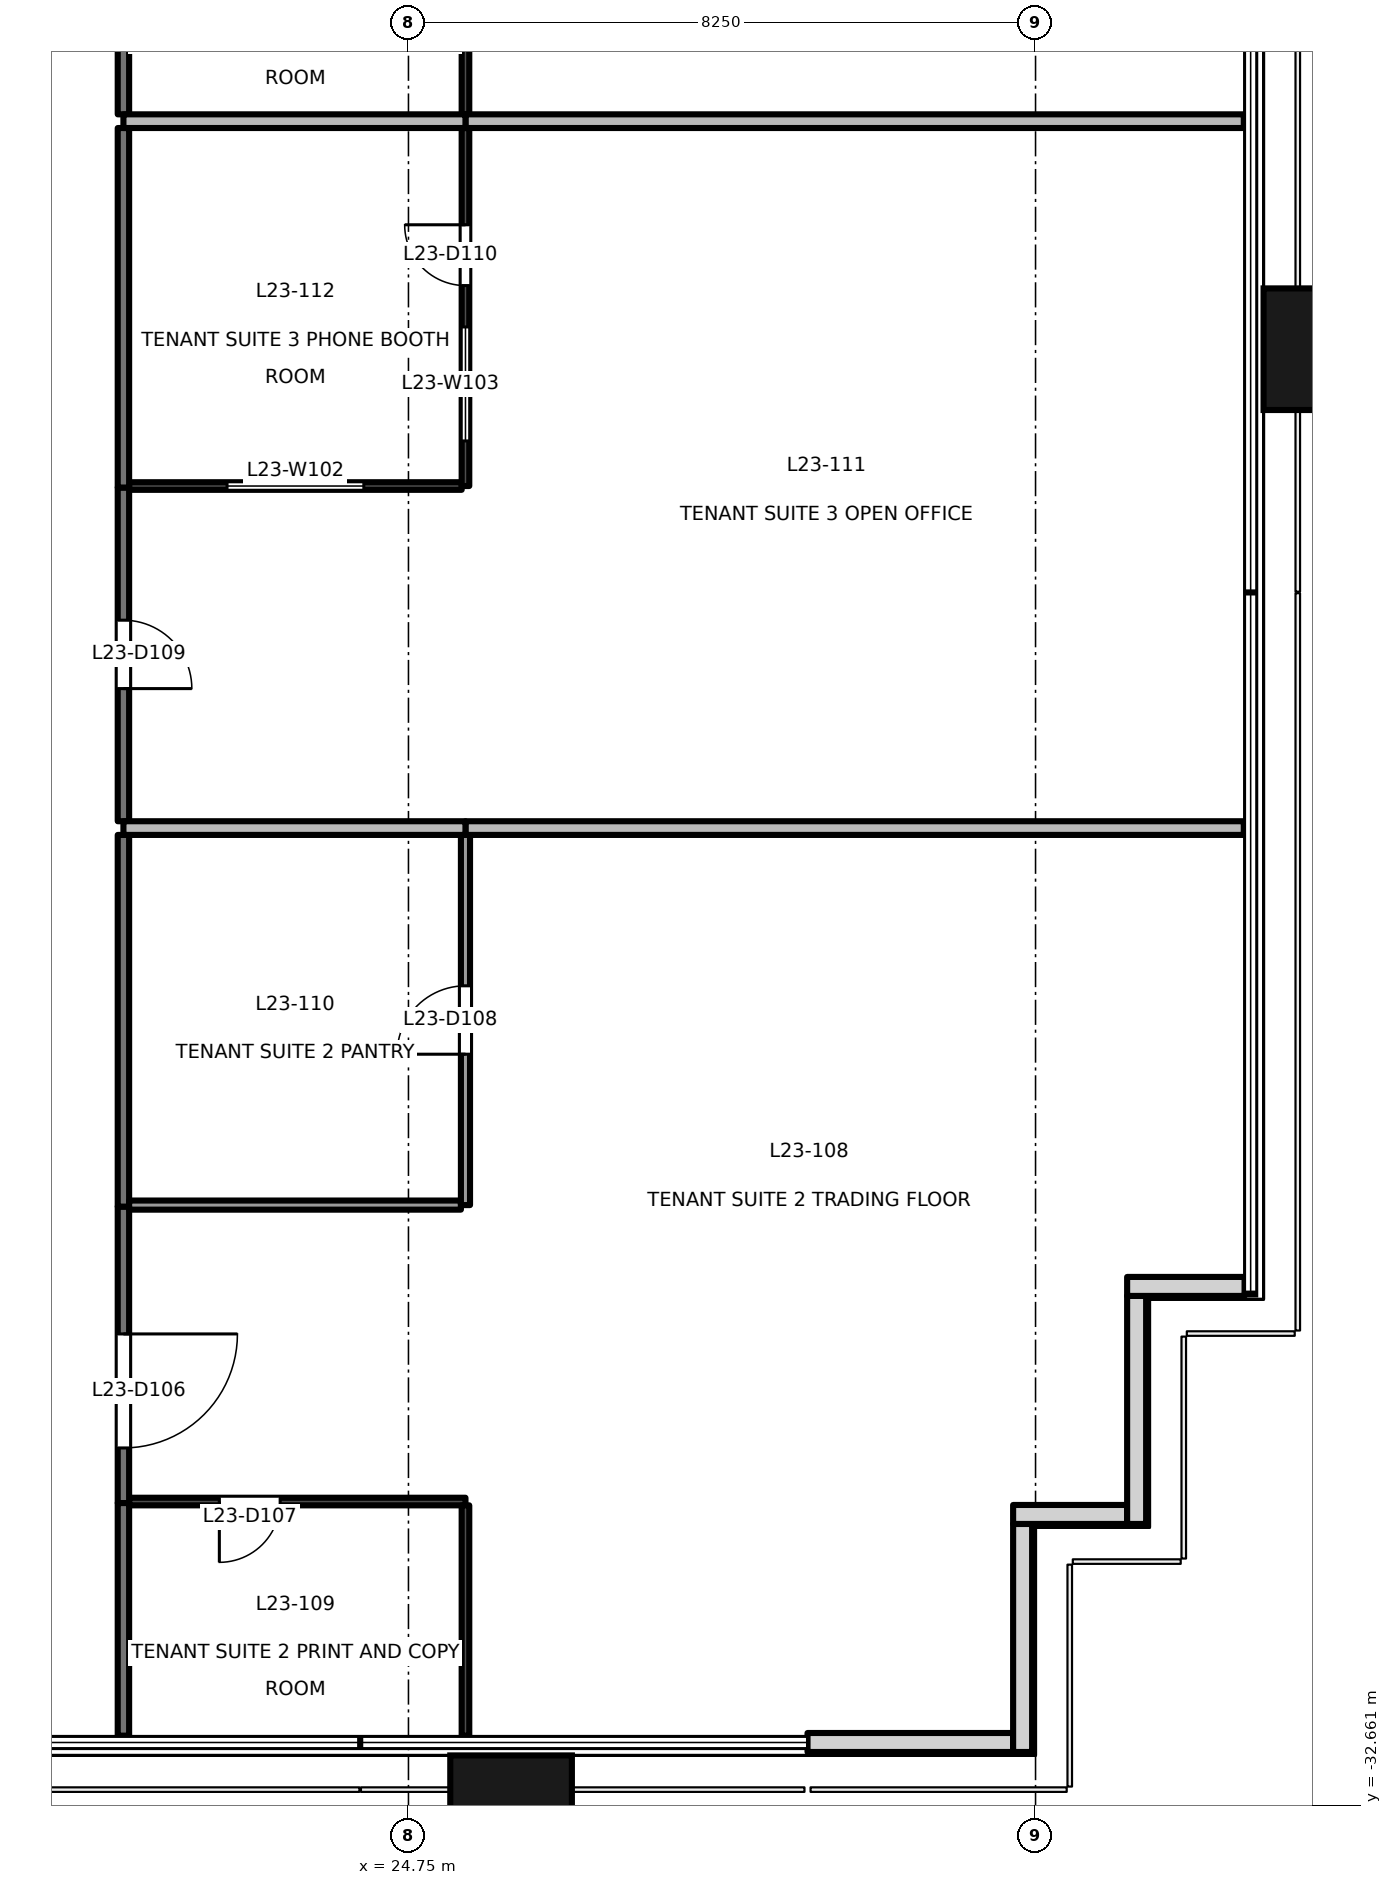
"""IFC4 building model, lengths in metres.
Left out: names, types, materials, properties, quantities, classifications, styles, units other than length and angle.
Written with IfcOpenShell. Run it as: python <this file> out.ifc"""

import sys

from ifc_helpers import new_model, si_unit, direction, frame, frame_2d, origin, origin_2d, place, context, subcontext, project, spatial, rectangle, extrude, element, fill, save


model = new_model("IFC4")
c1 = context("Model", 3, precision=1e-05, world=origin(), true_north=direction((0.0, 1.0)))
c2 = subcontext(c1, "Body", "Model", "MODEL_VIEW")
j1 = project(units=[si_unit("LENGTHUNIT", "METRE"), si_unit("PLANEANGLEUNIT", "RADIAN")], contexts=[c1])
p1 = place(None, origin())
s1 = spatial("IfcSite", under=j1, at=p1, CompositionType="ELEMENT")
p2 = place(p1, origin())
s2 = spatial("IfcBuilding", under=s1, at=p2, CompositionType="ELEMENT")
p3 = place(p2, frame((0.0, 0.0, 103.7)))
s3 = spatial("IfcBuildingStorey", under=s2, at=p3, CompositionType="ELEMENT", Elevation=103.7)
for number, where, z_axis, x_axis in (
    (1, (26.1, -32.9, -0.2), (0.0, 0.0, 1.0), (1.0, 0.0, 0.0)),
    (2, (36.9, -13.5, -0.2), (0.0, 0.0, 1.0), (0.0, 1.0, 0.0)),
):
    element("IfcColumn", number, at=place(p3, frame(where, z_axis=z_axis, x_axis=x_axis)), inside=s3, PredefinedType="COLUMN", context=c2, shape_type="SweptSolid", body=[
        extrude(rectangle(XDim=1.6, YDim=1.8, at=origin_2d()), origin(), (0.0, 0.0, 1.0), 4.0),
    ])
p4 = place(p3, frame((30.0, -31.83, 0.0), z_axis=(0.0, 0.0, 1.0), x_axis=(1.0, 0.0, 0.0)))
e3 = element("IfcWall", 3, at=p4, inside=s3, PredefinedType="SOLIDWALL", context=c2, shape_type="SweptSolid", body=[
    extrude(rectangle(XDim=2.705, YDim=0.25, at=frame_2d((1.353, 0.0))), origin(), (0.0, 0.0, 1.0), 3.8),
])
p5 = place(p3, frame((32.83, -31.955, 0.0), z_axis=(0.0, 0.0, 1.0), x_axis=(0.0, 1.0, 0.0)))
e4 = element("IfcWall", 4, at=p5, inside=s3, PredefinedType="SOLIDWALL", context=c2, shape_type="SweptSolid", body=[
    extrude(rectangle(XDim=3.0, YDim=0.25, at=frame_2d((1.5, 0.0))), origin(), (0.0, 0.0, 1.0), 3.8),
])
p6 = place(p3, frame((32.705, -28.83, 0.0), z_axis=(0.0, 0.0, 1.0), x_axis=(1.0, 0.0, 0.0)))
e5 = element("IfcWall", 5, at=p6, inside=s3, PredefinedType="SOLIDWALL", context=c2, shape_type="SweptSolid", body=[
    extrude(rectangle(XDim=1.5, YDim=0.25, at=frame_2d((0.75, 0.0))), origin(), (0.0, 0.0, 1.0), 3.8),
])
p7 = place(p3, frame((34.33, -28.955, 0.0), z_axis=(0.0, 0.0, 1.0), x_axis=(0.0, 1.0, 0.0)))
e6 = element("IfcWall", 6, at=p7, inside=s3, PredefinedType="SOLIDWALL", context=c2, shape_type="SweptSolid", body=[
    extrude(rectangle(XDim=3.0, YDim=0.25, at=frame_2d((1.5, 0.0))), origin(), (0.0, 0.0, 1.0), 3.8),
])
p8 = place(p3, frame((34.205, -25.83, 0.0), z_axis=(0.0, 0.0, 1.0), x_axis=(1.0, 0.0, 0.0)))
e7 = element("IfcWall", 7, at=p8, inside=s3, PredefinedType="SOLIDWALL", context=c2, shape_type="SweptSolid", body=[
    extrude(rectangle(XDim=1.545, YDim=0.25, at=frame_2d((0.772, 0.0))), origin(), (0.0, 0.0, 1.0), 3.8),
])
p9 = place(p3, frame((21.0, -24.78, 0.0), z_axis=(0.0, 0.0, 1.0), x_axis=(0.0, -1.0, 0.0)))
e8 = element("IfcWall", 8, at=p9, inside=s3, PredefinedType="PARTITIONING", context=c2, shape_type="SweptSolid", body=[
    extrude(rectangle(XDim=3.9, YDim=0.15, at=frame_2d((1.95, 0.0))), origin(), (0.0, 0.0, 1.0), 3.8),
])
p10 = place(p9, frame((1.675, 0.0, 0.0)))
e9 = element("IfcOpeningElement", 9, at=p10, cuts=e8, PredefinedType="OPENING", context=c2, shape_type="SweptSolid", body=[
    extrude(rectangle(XDim=1.5, YDim=2.1, at=frame_2d((0.75, 1.05))), frame((0.0, 0.085, 0.0), z_axis=(0.0, -1.0, 0.0), x_axis=(1.0, 0.0, 0.0)), (0.0, 0.0, 1.0), 0.171),
])
p11 = place(p3, frame((21.0, -28.68, 0.0), z_axis=(0.0, 0.0, 1.0), x_axis=(0.0, -1.0, 0.0)))
e10 = element("IfcWall", 10, at=p11, inside=s3, PredefinedType="PARTITIONING", context=c2, shape_type="SweptSolid", body=[
    extrude(rectangle(XDim=3.06, YDim=0.15, at=frame_2d((1.53, 0.0))), origin(), (0.0, 0.0, 1.0), 3.8),
])
p12 = place(p3, frame((21.0, -19.89, 0.0), z_axis=(0.0, 0.0, 1.0), x_axis=(0.0, -1.0, 0.0)))
e11 = element("IfcWall", 11, at=p12, inside=s3, PredefinedType="PARTITIONING", context=c2, shape_type="SweptSolid", body=[
    extrude(rectangle(XDim=4.89, YDim=0.15, at=frame_2d((2.445, 0.0))), origin(), (0.0, 0.0, 1.0), 3.8),
])
p13 = place(p3, frame((21.0, -15.32, 0.0), z_axis=(0.0, 0.0, 1.0), x_axis=(0.0, -1.0, 0.0)))
e12 = element("IfcWall", 12, at=p13, inside=s3, PredefinedType="PARTITIONING", context=c2, shape_type="SweptSolid", body=[
    extrude(rectangle(XDim=4.39, YDim=0.15, at=frame_2d((2.195, 0.0))), origin(), (0.0, 0.0, 1.0), 3.8),
])
p14 = place(p13, frame((1.745, 0.0, 0.0)))
e13 = element("IfcOpeningElement", 13, at=p14, cuts=e12, PredefinedType="OPENING", context=c2, shape_type="SweptSolid", body=[
    extrude(rectangle(XDim=0.9, YDim=2.1, at=frame_2d((0.45, 1.05))), frame((0.0, 0.085, 0.0), z_axis=(0.0, -1.0, 0.0), x_axis=(1.0, 0.0, 0.0)), (0.0, 0.0, 1.0), 0.171),
])
p15 = place(p3, frame((21.0, -10.59, 0.0), z_axis=(0.0, 0.0, 1.0), x_axis=(0.0, -1.0, 0.0)))
e14 = element("IfcWall", 14, at=p15, inside=s3, PredefinedType="PARTITIONING", context=c2, shape_type="SweptSolid", body=[
    extrude(rectangle(XDim=4.73, YDim=0.15, at=frame_2d((2.365, 0.0))), origin(), (0.0, 0.0, 1.0), 2.9),
])
p16 = place(p3, frame((21.0, -7.52, 0.0), z_axis=(0.0, 0.0, 1.0), x_axis=(0.0, -1.0, 0.0)))
e15 = element("IfcWall", 15, at=p16, inside=s3, PredefinedType="PARTITIONING", context=c2, shape_type="SweptSolid", body=[
    extrude(rectangle(XDim=2.89, YDim=0.15, at=frame_2d((1.445, 0.0))), origin(), (0.0, 0.0, 1.0), 2.9),
])
p17 = place(p3, frame((25.5, -28.66, 0.0), z_axis=(0.0, 0.0, 1.0), x_axis=(-1.0, 0.0, 0.0)))
e16 = element("IfcWall", 16, at=p17, inside=s3, PredefinedType="PARTITIONING", context=c2, shape_type="SweptSolid", body=[
    extrude(rectangle(XDim=4.425, YDim=0.1, at=frame_2d((2.212, 0.0))), origin(), (0.0, 0.0, 1.0), 3.8),
])
p18 = place(p17, frame((2.438, 0.0, 0.0)))
e17 = element("IfcOpeningElement", 17, at=p18, cuts=e16, PredefinedType="OPENING", context=c2, shape_type="SweptSolid", body=[
    extrude(rectangle(XDim=0.8, YDim=2.1, at=frame_2d((0.4, 1.05))), frame((0.0, 0.061, 0.0), z_axis=(0.0, -1.0, 0.0), x_axis=(1.0, 0.0, 0.0)), (0.0, 0.0, 1.0), 0.121),
])
p19 = place(p3, frame((25.5, -31.74, 0.0), z_axis=(0.0, 0.0, 1.0), x_axis=(0.0, 1.0, 0.0)))
e18 = element("IfcWall", 18, at=p19, inside=s3, PredefinedType="PARTITIONING", context=c2, shape_type="SweptSolid", body=[
    extrude(rectangle(XDim=3.03, YDim=0.1, at=frame_2d((1.515, 0.0))), origin(), (0.0, 0.0, 1.0), 3.8),
])
p20 = place(p3, frame((21.075, -24.76, 0.0), z_axis=(0.0, 0.0, 1.0), x_axis=(1.0, 0.0, 0.0)))
e19 = element("IfcWall", 19, at=p20, inside=s3, PredefinedType="PARTITIONING", context=c2, shape_type="SweptSolid", body=[
    extrude(rectangle(XDim=4.365, YDim=0.12, at=frame_2d((2.183, 0.0))), origin(), (0.0, 0.0, 1.0), 3.8),
])
p21 = place(p3, frame((25.5, -24.76, 0.0), z_axis=(0.0, 0.0, 1.0), x_axis=(0.0, 1.0, 0.0)))
e20 = element("IfcWall", 20, at=p21, inside=s3, PredefinedType="PARTITIONING", context=c2, shape_type="SweptSolid", body=[
    extrude(rectangle(XDim=4.87, YDim=0.12, at=frame_2d((2.435, 0.0))), origin(), (0.0, 0.0, 1.0), 3.8),
])
p22 = place(p21, frame((1.985, 0.0, 0.0)))
e21 = element("IfcOpeningElement", 21, at=p22, cuts=e20, PredefinedType="OPENING", context=c2, shape_type="SweptSolid", body=[
    extrude(rectangle(XDim=0.9, YDim=2.1, at=frame_2d((0.45, 1.05))), frame((0.0, 0.071, 0.0), z_axis=(0.0, -1.0, 0.0), x_axis=(1.0, 0.0, 0.0)), (0.0, 0.0, 1.0), 0.141),
])
p23 = place(p3, frame((25.5, -19.8, 0.0), z_axis=(0.0, 0.0, 1.0), x_axis=(1.0, 0.0, 0.0)))
e22 = element("IfcWall", 22, at=p23, inside=s3, PredefinedType="PARTITIONING", context=c2, shape_type="SweptSolid", body=[
    extrude(rectangle(XDim=10.24, YDim=0.18, at=frame_2d((5.12, 0.0))), origin(), (0.0, 0.0, 1.0), 3.8),
])
p24 = place(p3, frame((21.0, -19.8, 0.0), z_axis=(0.0, 0.0, 1.0), x_axis=(1.0, 0.0, 0.0)))
e23 = element("IfcWall", 23, at=p24, inside=s3, PredefinedType="PARTITIONING", context=c2, shape_type="SweptSolid", body=[
    extrude(rectangle(XDim=4.5, YDim=0.18, at=frame_2d((2.25, 0.0))), origin(), (0.0, 0.0, 1.0), 3.8),
])
p25 = place(p3, frame((21.075, -15.3, 0.0), z_axis=(0.0, 0.0, 1.0), x_axis=(1.0, 0.0, 0.0)))
e24 = element("IfcWall", 24, at=p25, inside=s3, PredefinedType="PARTITIONING", context=c2, shape_type="SweptSolid", body=[
    extrude(rectangle(XDim=4.375, YDim=0.1, at=frame_2d((2.188, 0.0))), origin(), (0.0, 0.0, 1.0), 3.8),
])
p26 = place(p25, frame((1.288, 0.0, 0.9)))
e25 = element("IfcOpeningElement", 25, at=p26, cuts=e24, PredefinedType="OPENING", context=c2, shape_type="SweptSolid", body=[
    extrude(rectangle(XDim=1.8, YDim=1.2, at=frame_2d((0.9, 0.6))), frame((0.0, 0.061, 0.0), z_axis=(0.0, -1.0, 0.0), x_axis=(1.0, 0.0, 0.0)), (0.0, 0.0, 1.0), 0.121),
])
p27 = place(p3, frame((25.5, -15.3, 0.0), z_axis=(0.0, 0.0, 1.0), x_axis=(0.0, 1.0, 0.0)))
e26 = element("IfcWall", 26, at=p27, inside=s3, PredefinedType="PARTITIONING", context=c2, shape_type="SweptSolid", body=[
    extrude(rectangle(XDim=4.71, YDim=0.1, at=frame_2d((2.355, 0.0))), origin(), (0.0, 0.0, 1.0), 2.9),
])
p28 = place(p27, frame((2.637, 0.0, 0.0)))
e27 = element("IfcOpeningElement", 27, at=p28, cuts=e26, PredefinedType="OPENING", context=c2, shape_type="SweptSolid", body=[
    extrude(rectangle(XDim=0.8, YDim=2.1, at=frame_2d((0.4, 1.05))), frame((0.0, 0.061, 0.0), z_axis=(0.0, -1.0, 0.0), x_axis=(1.0, 0.0, 0.0)), (0.0, 0.0, 1.0), 0.121),
])
p29 = place(p27, frame((0.593, 0.0, 0.9)))
e28 = element("IfcOpeningElement", 28, at=p29, cuts=e26, PredefinedType="OPENING", context=c2, shape_type="SweptSolid", body=[
    extrude(rectangle(XDim=1.5, YDim=1.2, at=frame_2d((0.75, 0.6))), frame((0.0, 0.061, 0.0), z_axis=(0.0, -1.0, 0.0), x_axis=(1.0, 0.0, 0.0)), (0.0, 0.0, 1.0), 0.121),
])
p30 = place(p3, frame((25.5, -10.5, 0.0), z_axis=(0.0, 0.0, 1.0), x_axis=(1.0, 0.0, 0.0)))
e29 = element("IfcWall", 29, at=p30, inside=s3, PredefinedType="PARTITIONING", context=c2, shape_type="SweptSolid", body=[
    extrude(rectangle(XDim=10.24, YDim=0.18, at=frame_2d((5.12, 0.0))), origin(), (0.0, 0.0, 1.0), 3.8),
])
p31 = place(p3, frame((21.0, -10.5, 0.0), z_axis=(0.0, 0.0, 1.0), x_axis=(1.0, 0.0, 0.0)))
e30 = element("IfcWall", 30, at=p31, inside=s3, PredefinedType="PARTITIONING", context=c2, shape_type="SweptSolid", body=[
    extrude(rectangle(XDim=4.5, YDim=0.18, at=frame_2d((2.25, 0.0))), origin(), (0.0, 0.0, 1.0), 3.8),
])
p32 = place(p3, frame((25.5, -10.41, 0.0), z_axis=(0.0, 0.0, 1.0), x_axis=(0.0, 1.0, 0.0)))
e31 = element("IfcWall", 31, at=p32, inside=s3, PredefinedType="PARTITIONING", context=c2, shape_type="SweptSolid", body=[
    extrude(rectangle(XDim=2.86, YDim=0.1, at=frame_2d((1.43, 0.0))), origin(), (0.0, 0.0, 1.0), 2.9),
])
p33 = place(p10, origin())
e32 = element("IfcDoor", 32, at=p33, inside=s3, OperationType="DOUBLE_DOOR_SINGLE_SWING", PredefinedType="DOOR", context=c2, shape_type="SweptSolid", body=[
    extrude(rectangle(XDim=1.5, YDim=2.1, at=frame_2d((0.75, 1.05))), frame((0.0, 0.025, 0.0), z_axis=(0.0, -1.0, 0.0), x_axis=(1.0, 0.0, 0.0)), (0.0, 0.0, 1.0), 0.05),
])
fill(e9, e32)
p34 = place(p18, origin())
e33 = element("IfcDoor", 33, at=p34, inside=s3, OperationType="SINGLE_SWING_RIGHT", PredefinedType="DOOR", context=c2, shape_type="SweptSolid", body=[
    extrude(rectangle(XDim=0.8, YDim=2.1, at=frame_2d((0.4, 1.05))), frame((0.0, 0.025, 0.0), z_axis=(0.0, -1.0, 0.0), x_axis=(1.0, 0.0, 0.0)), (0.0, 0.0, 1.0), 0.05),
])
fill(e17, e33)
p35 = place(p22, origin())
e34 = element("IfcDoor", 34, at=p35, inside=s3, OperationType="SINGLE_SWING_LEFT", PredefinedType="DOOR", context=c2, shape_type="SweptSolid", body=[
    extrude(rectangle(XDim=0.9, YDim=2.1, at=frame_2d((0.45, 1.05))), frame((0.0, 0.025, 0.0), z_axis=(0.0, -1.0, 0.0), x_axis=(1.0, 0.0, 0.0)), (0.0, 0.0, 1.0), 0.05),
])
fill(e21, e34)
p36 = place(p14, origin())
e35 = element("IfcDoor", 35, at=p36, inside=s3, OperationType="SINGLE_SWING_RIGHT", PredefinedType="DOOR", context=c2, shape_type="SweptSolid", body=[
    extrude(rectangle(XDim=0.9, YDim=2.1, at=frame_2d((0.45, 1.05))), frame((0.0, 0.025, 0.0), z_axis=(0.0, -1.0, 0.0), x_axis=(1.0, 0.0, 0.0)), (0.0, 0.0, 1.0), 0.05),
])
fill(e13, e35)
p37 = place(p28, origin())
e36 = element("IfcDoor", 36, at=p37, inside=s3, OperationType="SINGLE_SWING_RIGHT", PredefinedType="DOOR", context=c2, shape_type="SweptSolid", body=[
    extrude(rectangle(XDim=0.8, YDim=2.1, at=frame_2d((0.4, 1.05))), frame((0.0, 0.025, 0.0), z_axis=(0.0, -1.0, 0.0), x_axis=(1.0, 0.0, 0.0)), (0.0, 0.0, 1.0), 0.05),
])
fill(e27, e36)
p38 = place(p26, origin())
e37 = element("IfcWindow", 37, at=p38, inside=s3, PartitioningType="SINGLE_PANEL", PredefinedType="WINDOW", context=c2, shape_type="SweptSolid", body=[
    extrude(rectangle(XDim=1.8, YDim=1.2, at=frame_2d((0.9, 0.6))), frame((0.0, 0.03, 0.0), z_axis=(0.0, -1.0, 0.0), x_axis=(1.0, 0.0, 0.0)), (0.0, 0.0, 1.0), 0.06),
])
fill(e25, e37)
p39 = place(p29, origin())
e38 = element("IfcWindow", 38, at=p39, inside=s3, PartitioningType="SINGLE_PANEL", PredefinedType="WINDOW", context=c2, shape_type="SweptSolid", body=[
    extrude(rectangle(XDim=1.5, YDim=1.2, at=frame_2d((0.75, 0.6))), frame((0.0, 0.03, 0.0), z_axis=(0.0, -1.0, 0.0), x_axis=(1.0, 0.0, 0.0)), (0.0, 0.0, 1.0), 0.06),
])
fill(e28, e38)
save(model, sys.argv[1])
